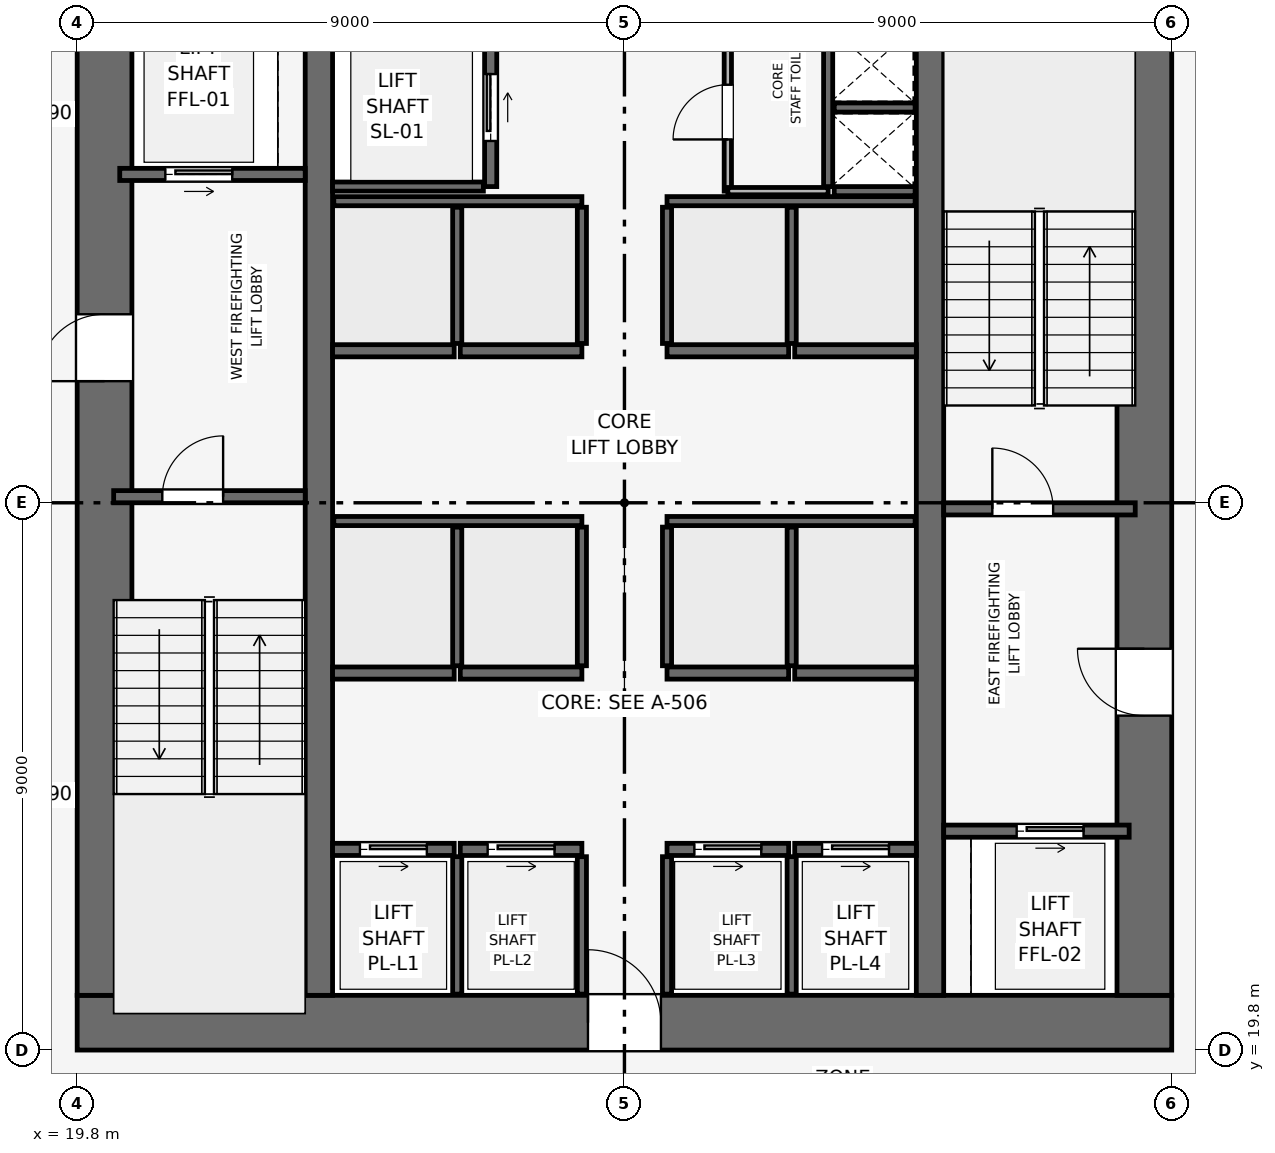
"""IFC4 building model, lengths in metres.
Left out: names, types, materials, properties, quantities, classifications, styles, units other than length and angle.
Written with IfcOpenShell. Run it as: python <this file> out.ifc"""

import sys

from ifc_helpers import new_model, si_unit, direction, frame, frame_2d, origin, place, context, subcontext, project, spatial, rectangle, extrude, element, fill, save


model = new_model("IFC4")
c1 = context("Model", 3, precision=1e-05, world=origin(), true_north=direction((0.0, 1.0)))
c2 = subcontext(c1, "Body", "Model", "MODEL_VIEW")
j1 = project(units=[si_unit("LENGTHUNIT", "METRE"), si_unit("PLANEANGLEUNIT", "RADIAN")], contexts=[c1])
p1 = place(None, origin())
s1 = spatial("IfcSite", under=j1, at=p1, CompositionType="ELEMENT")
p2 = place(p1, origin())
s2 = spatial("IfcBuilding", under=s1, at=p2, CompositionType="ELEMENT")
p3 = place(p2, frame((0.0, 0.0, 125.1)))
s3 = spatial("IfcBuildingStorey", under=s2, at=p3, CompositionType="ELEMENT", Elevation=125.1)
p4 = place(p3, frame((19.8, 20.25, 0.0), z_axis=(0.0, 0.0, 1.0), x_axis=(1.0, 0.0, 0.0)))
e1 = element("IfcWall", 1, at=p4, inside=s3, PredefinedType="SHEAR", context=c2, shape_type="SweptSolid", body=[
    extrude(rectangle(XDim=18.0, YDim=0.9, at=frame_2d((9.0, 0.0))), origin(), (0.0, 0.0, 1.0), 3.9),
])
p5 = place(p4, frame((8.4, 0.0, 0.0)))
e2 = element("IfcOpeningElement", 2, at=p5, cuts=e1, PredefinedType="OPENING", context=c2, shape_type="SweptSolid", body=[
    extrude(rectangle(XDim=1.2, YDim=2.2, at=frame_2d((0.6, 1.1))), frame((0.0, 0.46, 0.0), z_axis=(0.0, -1.0, 0.0), x_axis=(1.0, 0.0, 0.0)), (0.0, 0.0, 1.0), 0.92),
])
p6 = place(p3, frame((20.25, 20.7, 0.0), z_axis=(0.0, 0.0, 1.0), x_axis=(0.0, 1.0, 0.0)))
e3 = element("IfcWall", 3, at=p6, inside=s3, PredefinedType="SHEAR", context=c2, shape_type="SweptSolid", body=[
    extrude(rectangle(XDim=16.2, YDim=0.9, at=frame_2d((8.1, 0.0))), origin(), (0.0, 0.0, 1.0), 3.9),
])
p7 = place(p6, frame((10.1, 0.0, 0.0)))
e4 = element("IfcOpeningElement", 4, at=p7, cuts=e3, PredefinedType="OPENING", context=c2, shape_type="SweptSolid", body=[
    extrude(rectangle(XDim=1.1, YDim=2.15, at=frame_2d((0.55, 1.075))), frame((0.0, 0.46, 0.0), z_axis=(0.0, -1.0, 0.0), x_axis=(1.0, 0.0, 0.0)), (0.0, 0.0, 1.0), 0.92),
])
p8 = place(p3, frame((37.35, 20.7, 0.0), z_axis=(0.0, 0.0, 1.0), x_axis=(0.0, 1.0, 0.0)))
e5 = element("IfcWall", 5, at=p8, inside=s3, PredefinedType="SHEAR", context=c2, shape_type="SweptSolid", body=[
    extrude(rectangle(XDim=16.2, YDim=0.9, at=frame_2d((8.1, 0.0))), origin(), (0.0, 0.0, 1.0), 3.9),
])
p9 = place(p8, frame((4.6, 0.0, 0.0)))
e6 = element("IfcOpeningElement", 6, at=p9, cuts=e5, PredefinedType="OPENING", context=c2, shape_type="SweptSolid", body=[
    extrude(rectangle(XDim=1.1, YDim=2.15, at=frame_2d((0.55, 1.075))), frame((0.0, 0.46, 0.0), z_axis=(0.0, -1.0, 0.0), x_axis=(1.0, 0.0, 0.0)), (0.0, 0.0, 1.0), 0.92),
])
for number, where, z_axis, x_axis in (
    (7, (23.775, 20.7, 0.0), (0.0, 0.0, 1.0), (0.0, 1.0, 0.0)),
    (8, (33.825, 20.7, 0.0), (0.0, 0.0, 1.0), (0.0, 1.0, 0.0)),
):
    element("IfcWall", number, at=place(p3, frame(where, z_axis=z_axis, x_axis=x_axis)), inside=s3, PredefinedType="SHEAR", context=c2, shape_type="SweptSolid", body=[
        extrude(rectangle(XDim=16.2, YDim=0.45, at=frame_2d((8.1, 0.0))), origin(), (0.0, 0.0, 1.0), 3.9),
    ])
p10 = place(p3, frame((20.4, 28.9, 0.0), z_axis=(0.0, 0.0, 1.0), x_axis=(1.0, 0.0, 0.0)))
e9 = element("IfcWall", 9, at=p10, inside=s3, PredefinedType="SHEAR", context=c2, shape_type="SweptSolid", body=[
    extrude(rectangle(XDim=3.15, YDim=0.2, at=frame_2d((1.575, 0.0))), origin(), (0.0, 0.0, 1.0), 3.65),
])
p11 = place(p10, frame((0.8, 0.0, 0.0)))
e10 = element("IfcOpeningElement", 10, at=p11, cuts=e9, PredefinedType="OPENING", context=c2, shape_type="SweptSolid", body=[
    extrude(rectangle(XDim=1.0, YDim=2.1, at=frame_2d((0.5, 1.05))), frame((0.0, 0.11, 0.0), z_axis=(0.0, -1.0, 0.0), x_axis=(1.0, 0.0, 0.0)), (0.0, 0.0, 1.0), 0.22),
])
p12 = place(p3, frame((34.05, 28.7, 0.0), z_axis=(0.0, 0.0, 1.0), x_axis=(1.0, 0.0, 0.0)))
e11 = element("IfcWall", 11, at=p12, inside=s3, PredefinedType="SHEAR", context=c2, shape_type="SweptSolid", body=[
    extrude(rectangle(XDim=3.15, YDim=0.2, at=frame_2d((1.575, 0.0))), origin(), (0.0, 0.0, 1.0), 3.65),
])
p13 = place(p12, frame((0.8, 0.0, 0.0)))
e12 = element("IfcOpeningElement", 12, at=p13, cuts=e11, PredefinedType="OPENING", context=c2, shape_type="SweptSolid", body=[
    extrude(rectangle(XDim=1.0, YDim=2.1, at=frame_2d((0.5, 1.05))), frame((0.0, 0.11, 0.0), z_axis=(0.0, -1.0, 0.0), x_axis=(1.0, 0.0, 0.0)), (0.0, 0.0, 1.0), 0.22),
])
p14 = place(p3, frame((32.15, 34.0, 0.0), z_axis=(0.0, 0.0, 1.0), x_axis=(0.0, 1.0, 0.0)))
e13 = element("IfcWall", 13, at=p14, inside=s3, PredefinedType="SHEAR", context=c2, shape_type="SweptSolid", body=[
    extrude(rectangle(XDim=2.9, YDim=0.15, at=frame_2d((1.45, 0.0))), origin(), (0.0, 0.0, 1.0), 3.65),
])
for number, where, z_axis, x_axis in (
    (14, (32.25, 33.925, 0.0), (0.0, 0.0, 1.0), (1.0, 0.0, 0.0)),
    (15, (32.25, 35.3, 0.0), (0.0, 0.0, 1.0), (1.0, 0.0, 0.0)),
):
    element("IfcWall", number, at=place(p3, frame(where, z_axis=z_axis, x_axis=x_axis)), inside=s3, PredefinedType="SHEAR", context=c2, shape_type="SweptSolid", body=[
        extrude(rectangle(XDim=1.33, YDim=0.15, at=frame_2d((0.665, 0.0))), origin(), (0.0, 0.0, 1.0), 3.65),
    ])
p15 = place(p3, frame((20.5, 34.2, 0.0), z_axis=(0.0, 0.0, 1.0), x_axis=(1.0, 0.0, 0.0)))
e16 = element("IfcWall", 16, at=p15, inside=s3, PredefinedType="SHEAR", context=c2, shape_type="SweptSolid", body=[
    extrude(rectangle(XDim=3.05, YDim=0.2, at=frame_2d((1.525, 0.0))), origin(), (0.0, 0.0, 1.0), 3.65),
])
p16 = place(p15, frame((0.75, 0.0, 0.0)))
e17 = element("IfcOpeningElement", 17, at=p16, cuts=e16, PredefinedType="OPENING", context=c2, shape_type="SweptSolid", body=[
    extrude(rectangle(XDim=1.1, YDim=2.15, at=frame_2d((0.55, 1.075))), frame((0.0, 0.11, 0.0), z_axis=(0.0, -1.0, 0.0), x_axis=(1.0, 0.0, 0.0)), (0.0, 0.0, 1.0), 0.22),
])
p17 = place(p3, frame((34.05, 23.4, 0.0), z_axis=(0.0, 0.0, 1.0), x_axis=(1.0, 0.0, 0.0)))
e18 = element("IfcWall", 18, at=p17, inside=s3, PredefinedType="SHEAR", context=c2, shape_type="SweptSolid", body=[
    extrude(rectangle(XDim=3.05, YDim=0.2, at=frame_2d((1.525, 0.0))), origin(), (0.0, 0.0, 1.0), 3.65),
])
p18 = place(p17, frame((1.2, 0.0, 0.0)))
e19 = element("IfcOpeningElement", 19, at=p18, cuts=e18, PredefinedType="OPENING", context=c2, shape_type="SweptSolid", body=[
    extrude(rectangle(XDim=1.1, YDim=2.15, at=frame_2d((0.55, 1.075))), frame((0.0, 0.11, 0.0), z_axis=(0.0, -1.0, 0.0), x_axis=(1.0, 0.0, 0.0)), (0.0, 0.0, 1.0), 0.22),
])
p19 = place(p3, frame((26.6, 34.0, 0.0), z_axis=(0.0, 0.0, 1.0), x_axis=(0.0, 1.0, 0.0)))
e20 = element("IfcWall", 20, at=p19, inside=s3, PredefinedType="SHEAR", context=c2, shape_type="SweptSolid", body=[
    extrude(rectangle(XDim=2.9, YDim=0.2, at=frame_2d((1.45, 0.0))), origin(), (0.0, 0.0, 1.0), 3.65),
])
p20 = place(p19, frame((0.75, 0.0, 0.0)))
e21 = element("IfcOpeningElement", 21, at=p20, cuts=e20, PredefinedType="OPENING", context=c2, shape_type="SweptSolid", body=[
    extrude(rectangle(XDim=1.1, YDim=2.15, at=frame_2d((0.55, 1.075))), frame((0.0, 0.11, 0.0), z_axis=(0.0, -1.0, 0.0), x_axis=(1.0, 0.0, 0.0)), (0.0, 0.0, 1.0), 0.22),
])
p21 = place(p3, frame((24.0, 34.0, 0.0), z_axis=(0.0, 0.0, 1.0), x_axis=(1.0, 0.0, 0.0)))
e22 = element("IfcWall", 22, at=p21, inside=s3, PredefinedType="SHEAR", context=c2, shape_type="SweptSolid", body=[
    extrude(rectangle(XDim=2.48, YDim=0.15, at=frame_2d((1.24, 0.0))), origin(), (0.0, 0.0, 1.0), 3.65),
])
p22 = place(p3, frame((24.0, 23.1, 0.0), z_axis=(0.0, 0.0, 1.0), x_axis=(1.0, 0.0, 0.0)))
e23 = element("IfcWall", 23, at=p22, inside=s3, PredefinedType="SHEAR", context=c2, shape_type="SweptSolid", body=[
    extrude(rectangle(XDim=2.0, YDim=0.2, at=frame_2d((1.0, 0.0))), origin(), (0.0, 0.0, 1.0), 3.65),
])
p23 = place(p22, frame((0.45, 0.0, 0.0)))
e24 = element("IfcOpeningElement", 24, at=p23, cuts=e23, PredefinedType="OPENING", context=c2, shape_type="SweptSolid", body=[
    extrude(rectangle(XDim=1.1, YDim=2.15, at=frame_2d((0.55, 1.075))), frame((0.0, 0.11, 0.0), z_axis=(0.0, -1.0, 0.0), x_axis=(1.0, 0.0, 0.0)), (0.0, 0.0, 1.0), 0.22),
])
p24 = place(p3, frame((26.1, 23.1, 0.0), z_axis=(0.0, 0.0, 1.0), x_axis=(1.0, 0.0, 0.0)))
e25 = element("IfcWall", 25, at=p24, inside=s3, PredefinedType="SHEAR", context=c2, shape_type="SweptSolid", body=[
    extrude(rectangle(XDim=2.0, YDim=0.2, at=frame_2d((1.0, 0.0))), origin(), (0.0, 0.0, 1.0), 3.65),
])
p25 = place(p24, frame((0.45, 0.0, 0.0)))
e26 = element("IfcOpeningElement", 26, at=p25, cuts=e25, PredefinedType="OPENING", context=c2, shape_type="SweptSolid", body=[
    extrude(rectangle(XDim=1.1, YDim=2.15, at=frame_2d((0.55, 1.075))), frame((0.0, 0.11, 0.0), z_axis=(0.0, -1.0, 0.0), x_axis=(1.0, 0.0, 0.0)), (0.0, 0.0, 1.0), 0.22),
])
p26 = place(p3, frame((29.5, 23.1, 0.0), z_axis=(0.0, 0.0, 1.0), x_axis=(1.0, 0.0, 0.0)))
e27 = element("IfcWall", 27, at=p26, inside=s3, PredefinedType="SHEAR", context=c2, shape_type="SweptSolid", body=[
    extrude(rectangle(XDim=2.0, YDim=0.2, at=frame_2d((1.0, 0.0))), origin(), (0.0, 0.0, 1.0), 3.65),
])
p27 = place(p26, frame((0.45, 0.0, 0.0)))
e28 = element("IfcOpeningElement", 28, at=p27, cuts=e27, PredefinedType="OPENING", context=c2, shape_type="SweptSolid", body=[
    extrude(rectangle(XDim=1.1, YDim=2.15, at=frame_2d((0.55, 1.075))), frame((0.0, 0.11, 0.0), z_axis=(0.0, -1.0, 0.0), x_axis=(1.0, 0.0, 0.0)), (0.0, 0.0, 1.0), 0.22),
])
p28 = place(p3, frame((31.6, 23.1, 0.0), z_axis=(0.0, 0.0, 1.0), x_axis=(1.0, 0.0, 0.0)))
e29 = element("IfcWall", 29, at=p28, inside=s3, PredefinedType="SHEAR", context=c2, shape_type="SweptSolid", body=[
    extrude(rectangle(XDim=2.0, YDim=0.2, at=frame_2d((1.0, 0.0))), origin(), (0.0, 0.0, 1.0), 3.65),
])
p29 = place(p28, frame((0.45, 0.0, 0.0)))
e30 = element("IfcOpeningElement", 30, at=p29, cuts=e29, PredefinedType="OPENING", context=c2, shape_type="SweptSolid", body=[
    extrude(rectangle(XDim=1.1, YDim=2.15, at=frame_2d((0.55, 1.075))), frame((0.0, 0.11, 0.0), z_axis=(0.0, -1.0, 0.0), x_axis=(1.0, 0.0, 0.0)), (0.0, 0.0, 1.0), 0.22),
])
for number, where, z_axis, x_axis in (
    (31, (24.0, 26.0, 0.0), (0.0, 0.0, 1.0), (1.0, 0.0, 0.0)),
    (32, (26.1, 26.0, 0.0), (0.0, 0.0, 1.0), (1.0, 0.0, 0.0)),
    (33, (29.5, 26.0, 0.0), (0.0, 0.0, 1.0), (1.0, 0.0, 0.0)),
    (34, (31.6, 26.0, 0.0), (0.0, 0.0, 1.0), (1.0, 0.0, 0.0)),
    (35, (24.0, 31.3, 0.0), (0.0, 0.0, 1.0), (1.0, 0.0, 0.0)),
    (36, (26.1, 31.3, 0.0), (0.0, 0.0, 1.0), (1.0, 0.0, 0.0)),
    (37, (29.5, 31.3, 0.0), (0.0, 0.0, 1.0), (1.0, 0.0, 0.0)),
    (38, (31.6, 31.3, 0.0), (0.0, 0.0, 1.0), (1.0, 0.0, 0.0)),
):
    element("IfcWall", number, at=place(p3, frame(where, z_axis=z_axis, x_axis=x_axis)), inside=s3, PredefinedType="SHEAR", context=c2, shape_type="SweptSolid", body=[
        extrude(rectangle(XDim=2.0, YDim=0.2, at=frame_2d((1.0, 0.0))), origin(), (0.0, 0.0, 1.0), 3.65),
    ])
for number, where, z_axis, x_axis in (
    (39, (26.05, 20.72, 0.0), (0.0, 0.0, 1.0), (0.0, 1.0, 0.0)),
    (40, (28.1, 20.72, 0.0), (0.0, 0.0, 1.0), (0.0, 1.0, 0.0)),
    (41, (29.5, 20.72, 0.0), (0.0, 0.0, 1.0), (0.0, 1.0, 0.0)),
    (42, (31.55, 20.72, 0.0), (0.0, 0.0, 1.0), (0.0, 1.0, 0.0)),
):
    element("IfcWall", number, at=place(p3, frame(where, z_axis=z_axis, x_axis=x_axis)), inside=s3, PredefinedType="SHEAR", context=c2, shape_type="SweptSolid", body=[
        extrude(rectangle(XDim=2.26, YDim=0.15, at=frame_2d((1.13, 0.0))), origin(), (0.0, 0.0, 1.0), 3.65),
    ])
for number, where, z_axis, x_axis in (
    (43, (24.02, 28.5, 0.0), (0.0, 0.0, 1.0), (1.0, 0.0, 0.0)),
    (44, (29.5, 28.5, 0.0), (0.0, 0.0, 1.0), (1.0, 0.0, 0.0)),
):
    element("IfcWall", number, at=place(p3, frame(where, z_axis=z_axis, x_axis=x_axis)), inside=s3, PredefinedType="SHEAR", context=c2, shape_type="SweptSolid", body=[
        extrude(rectangle(XDim=4.08, YDim=0.15, at=frame_2d((2.04, 0.0))), origin(), (0.0, 0.0, 1.0), 3.65),
    ])
for number, where, z_axis, x_axis in (
    (45, (26.05, 26.12, 0.0), (0.0, 0.0, 1.0), (0.0, 1.0, 0.0)),
    (46, (28.1, 26.12, 0.0), (0.0, 0.0, 1.0), (0.0, 1.0, 0.0)),
    (47, (29.5, 26.12, 0.0), (0.0, 0.0, 1.0), (0.0, 1.0, 0.0)),
    (48, (31.55, 26.12, 0.0), (0.0, 0.0, 1.0), (0.0, 1.0, 0.0)),
):
    element("IfcWall", number, at=place(p3, frame(where, z_axis=z_axis, x_axis=x_axis)), inside=s3, PredefinedType="SHEAR", context=c2, shape_type="SweptSolid", body=[
        extrude(rectangle(XDim=2.28, YDim=0.15, at=frame_2d((1.14, 0.0))), origin(), (0.0, 0.0, 1.0), 3.65),
    ])
for number, where, z_axis, x_axis in (
    (49, (24.02, 33.76, 0.0), (0.0, 0.0, 1.0), (1.0, 0.0, 0.0)),
    (50, (29.5, 33.76, 0.0), (0.0, 0.0, 1.0), (1.0, 0.0, 0.0)),
):
    element("IfcWall", number, at=place(p3, frame(where, z_axis=z_axis, x_axis=x_axis)), inside=s3, PredefinedType="SHEAR", context=c2, shape_type="SweptSolid", body=[
        extrude(rectangle(XDim=4.08, YDim=0.15, at=frame_2d((2.04, 0.0))), origin(), (0.0, 0.0, 1.0), 3.65),
    ])
for number, where, z_axis, x_axis in (
    (51, (26.05, 31.42, 0.0), (0.0, 0.0, 1.0), (0.0, 1.0, 0.0)),
    (52, (28.1, 31.42, 0.0), (0.0, 0.0, 1.0), (0.0, 1.0, 0.0)),
    (53, (29.5, 31.42, 0.0), (0.0, 0.0, 1.0), (0.0, 1.0, 0.0)),
    (54, (31.55, 31.42, 0.0), (0.0, 0.0, 1.0), (0.0, 1.0, 0.0)),
):
    element("IfcWall", number, at=place(p3, frame(where, z_axis=z_axis, x_axis=x_axis)), inside=s3, PredefinedType="SHEAR", context=c2, shape_type="SweptSolid", body=[
        extrude(rectangle(XDim=2.24, YDim=0.15, at=frame_2d((1.12, 0.0))), origin(), (0.0, 0.0, 1.0), 3.65),
    ])
p30 = place(p3, frame((30.5, 33.925, 0.0), z_axis=(0.0, 0.0, 1.0), x_axis=(0.0, 1.0, 0.0)))
e55 = element("IfcWall", 55, at=p30, inside=s3, PredefinedType="PARTITIONING", context=c2, shape_type="SweptSolid", body=[
    extrude(rectangle(XDim=2.975, YDim=0.12, at=frame_2d((1.487, 0.0))), origin(), (0.0, 0.0, 1.0), 3.65),
])
p31 = place(p30, frame((0.85, 0.0, 0.0)))
e56 = element("IfcOpeningElement", 56, at=p31, cuts=e55, PredefinedType="OPENING", context=c2, shape_type="SweptSolid", body=[
    extrude(rectangle(XDim=0.9, YDim=2.1, at=frame_2d((0.45, 1.05))), frame((0.0, 0.07, 0.0), z_axis=(0.0, -1.0, 0.0), x_axis=(1.0, 0.0, 0.0)), (0.0, 0.0, 1.0), 0.14),
])
p32 = place(p3, frame((30.5, 33.925, 0.0), z_axis=(0.0, 0.0, 1.0), x_axis=(1.0, 0.0, 0.0)))
e57 = element("IfcWall", 57, at=p32, inside=s3, PredefinedType="PARTITIONING", context=c2, shape_type="SweptSolid", body=[
    extrude(rectangle(XDim=1.65, YDim=0.12, at=frame_2d((0.825, 0.0))), origin(), (0.0, 0.0, 1.0), 3.65),
])
p33 = place(p11, origin())
e58 = element("IfcDoor", 58, at=p33, inside=s3, OperationType="SINGLE_SWING_RIGHT", PredefinedType="DOOR", context=c2, shape_type="SweptSolid", body=[
    extrude(rectangle(XDim=1.0, YDim=2.1, at=frame_2d((0.5, 1.05))), frame((0.0, 0.025, 0.0), z_axis=(0.0, -1.0, 0.0), x_axis=(1.0, 0.0, 0.0)), (0.0, 0.0, 1.0), 0.05),
])
fill(e10, e58)
p34 = place(p13, origin())
e59 = element("IfcDoor", 59, at=p34, inside=s3, OperationType="SINGLE_SWING_LEFT", PredefinedType="DOOR", context=c2, shape_type="SweptSolid", body=[
    extrude(rectangle(XDim=1.0, YDim=2.1, at=frame_2d((0.5, 1.05))), frame((0.0, 0.025, 0.0), z_axis=(0.0, -1.0, 0.0), x_axis=(1.0, 0.0, 0.0)), (0.0, 0.0, 1.0), 0.05),
])
fill(e12, e59)
p35 = place(p16, origin())
e60 = element("IfcDoor", 60, at=p35, inside=s3, OperationType="SLIDING_TO_RIGHT", PredefinedType="DOOR", context=c2, shape_type="SweptSolid", body=[
    extrude(rectangle(XDim=1.1, YDim=2.15, at=frame_2d((0.55, 1.075))), frame((0.0, 0.025, 0.0), z_axis=(0.0, -1.0, 0.0), x_axis=(1.0, 0.0, 0.0)), (0.0, 0.0, 1.0), 0.05),
])
fill(e17, e60)
p36 = place(p18, origin())
e61 = element("IfcDoor", 61, at=p36, inside=s3, OperationType="SLIDING_TO_RIGHT", PredefinedType="DOOR", context=c2, shape_type="SweptSolid", body=[
    extrude(rectangle(XDim=1.1, YDim=2.15, at=frame_2d((0.55, 1.075))), frame((0.0, 0.025, 0.0), z_axis=(0.0, -1.0, 0.0), x_axis=(1.0, 0.0, 0.0)), (0.0, 0.0, 1.0), 0.05),
])
fill(e19, e61)
p37 = place(p20, origin())
e62 = element("IfcDoor", 62, at=p37, inside=s3, OperationType="SLIDING_TO_RIGHT", PredefinedType="DOOR", context=c2, shape_type="SweptSolid", body=[
    extrude(rectangle(XDim=1.1, YDim=2.15, at=frame_2d((0.55, 1.075))), frame((0.0, 0.025, 0.0), z_axis=(0.0, -1.0, 0.0), x_axis=(1.0, 0.0, 0.0)), (0.0, 0.0, 1.0), 0.05),
])
fill(e21, e62)
p38 = place(p23, origin())
e63 = element("IfcDoor", 63, at=p38, inside=s3, OperationType="SLIDING_TO_RIGHT", PredefinedType="DOOR", context=c2, shape_type="SweptSolid", body=[
    extrude(rectangle(XDim=1.1, YDim=2.15, at=frame_2d((0.55, 1.075))), frame((0.0, 0.025, 0.0), z_axis=(0.0, -1.0, 0.0), x_axis=(1.0, 0.0, 0.0)), (0.0, 0.0, 1.0), 0.05),
])
fill(e24, e63)
p39 = place(p25, origin())
e64 = element("IfcDoor", 64, at=p39, inside=s3, OperationType="SLIDING_TO_RIGHT", PredefinedType="DOOR", context=c2, shape_type="SweptSolid", body=[
    extrude(rectangle(XDim=1.1, YDim=2.15, at=frame_2d((0.55, 1.075))), frame((0.0, 0.025, 0.0), z_axis=(0.0, -1.0, 0.0), x_axis=(1.0, 0.0, 0.0)), (0.0, 0.0, 1.0), 0.05),
])
fill(e26, e64)
p40 = place(p27, origin())
e65 = element("IfcDoor", 65, at=p40, inside=s3, OperationType="SLIDING_TO_RIGHT", PredefinedType="DOOR", context=c2, shape_type="SweptSolid", body=[
    extrude(rectangle(XDim=1.1, YDim=2.15, at=frame_2d((0.55, 1.075))), frame((0.0, 0.025, 0.0), z_axis=(0.0, -1.0, 0.0), x_axis=(1.0, 0.0, 0.0)), (0.0, 0.0, 1.0), 0.05),
])
fill(e28, e65)
p41 = place(p29, origin())
e66 = element("IfcDoor", 66, at=p41, inside=s3, OperationType="SLIDING_TO_RIGHT", PredefinedType="DOOR", context=c2, shape_type="SweptSolid", body=[
    extrude(rectangle(XDim=1.1, YDim=2.15, at=frame_2d((0.55, 1.075))), frame((0.0, 0.025, 0.0), z_axis=(0.0, -1.0, 0.0), x_axis=(1.0, 0.0, 0.0)), (0.0, 0.0, 1.0), 0.05),
])
fill(e30, e66)
p42 = place(p31, origin())
e67 = element("IfcDoor", 67, at=p42, inside=s3, OperationType="SINGLE_SWING_LEFT", PredefinedType="DOOR", context=c2, shape_type="SweptSolid", body=[
    extrude(rectangle(XDim=0.9, YDim=2.1, at=frame_2d((0.45, 1.05))), frame((0.0, 0.025, 0.0), z_axis=(0.0, -1.0, 0.0), x_axis=(1.0, 0.0, 0.0)), (0.0, 0.0, 1.0), 0.05),
])
fill(e56, e67)
p43 = place(p7, origin())
e68 = element("IfcDoor", 68, at=p43, inside=s3, OperationType="SINGLE_SWING_LEFT", PredefinedType="DOOR", context=c2, shape_type="SweptSolid", body=[
    extrude(rectangle(XDim=1.1, YDim=2.15, at=frame_2d((0.55, 1.075))), frame((0.0, 0.025, 0.0), z_axis=(0.0, -1.0, 0.0), x_axis=(1.0, 0.0, 0.0)), (0.0, 0.0, 1.0), 0.05),
])
fill(e4, e68)
p44 = place(p9, origin())
e69 = element("IfcDoor", 69, at=p44, inside=s3, OperationType="SINGLE_SWING_RIGHT", PredefinedType="DOOR", context=c2, shape_type="SweptSolid", body=[
    extrude(rectangle(XDim=1.1, YDim=2.15, at=frame_2d((0.55, 1.075))), frame((0.0, 0.025, 0.0), z_axis=(0.0, -1.0, 0.0), x_axis=(1.0, 0.0, 0.0)), (0.0, 0.0, 1.0), 0.05),
])
fill(e6, e69)
p45 = place(p5, origin())
e70 = element("IfcDoor", 70, at=p45, inside=s3, OperationType="SINGLE_SWING_LEFT", PredefinedType="DOOR", context=c2, shape_type="SweptSolid", body=[
    extrude(rectangle(XDim=1.2, YDim=2.2, at=frame_2d((0.6, 1.1))), frame((0.0, 0.025, 0.0), z_axis=(0.0, -1.0, 0.0), x_axis=(1.0, 0.0, 0.0)), (0.0, 0.0, 1.0), 0.05),
])
fill(e2, e70)
save(model, sys.argv[1])
